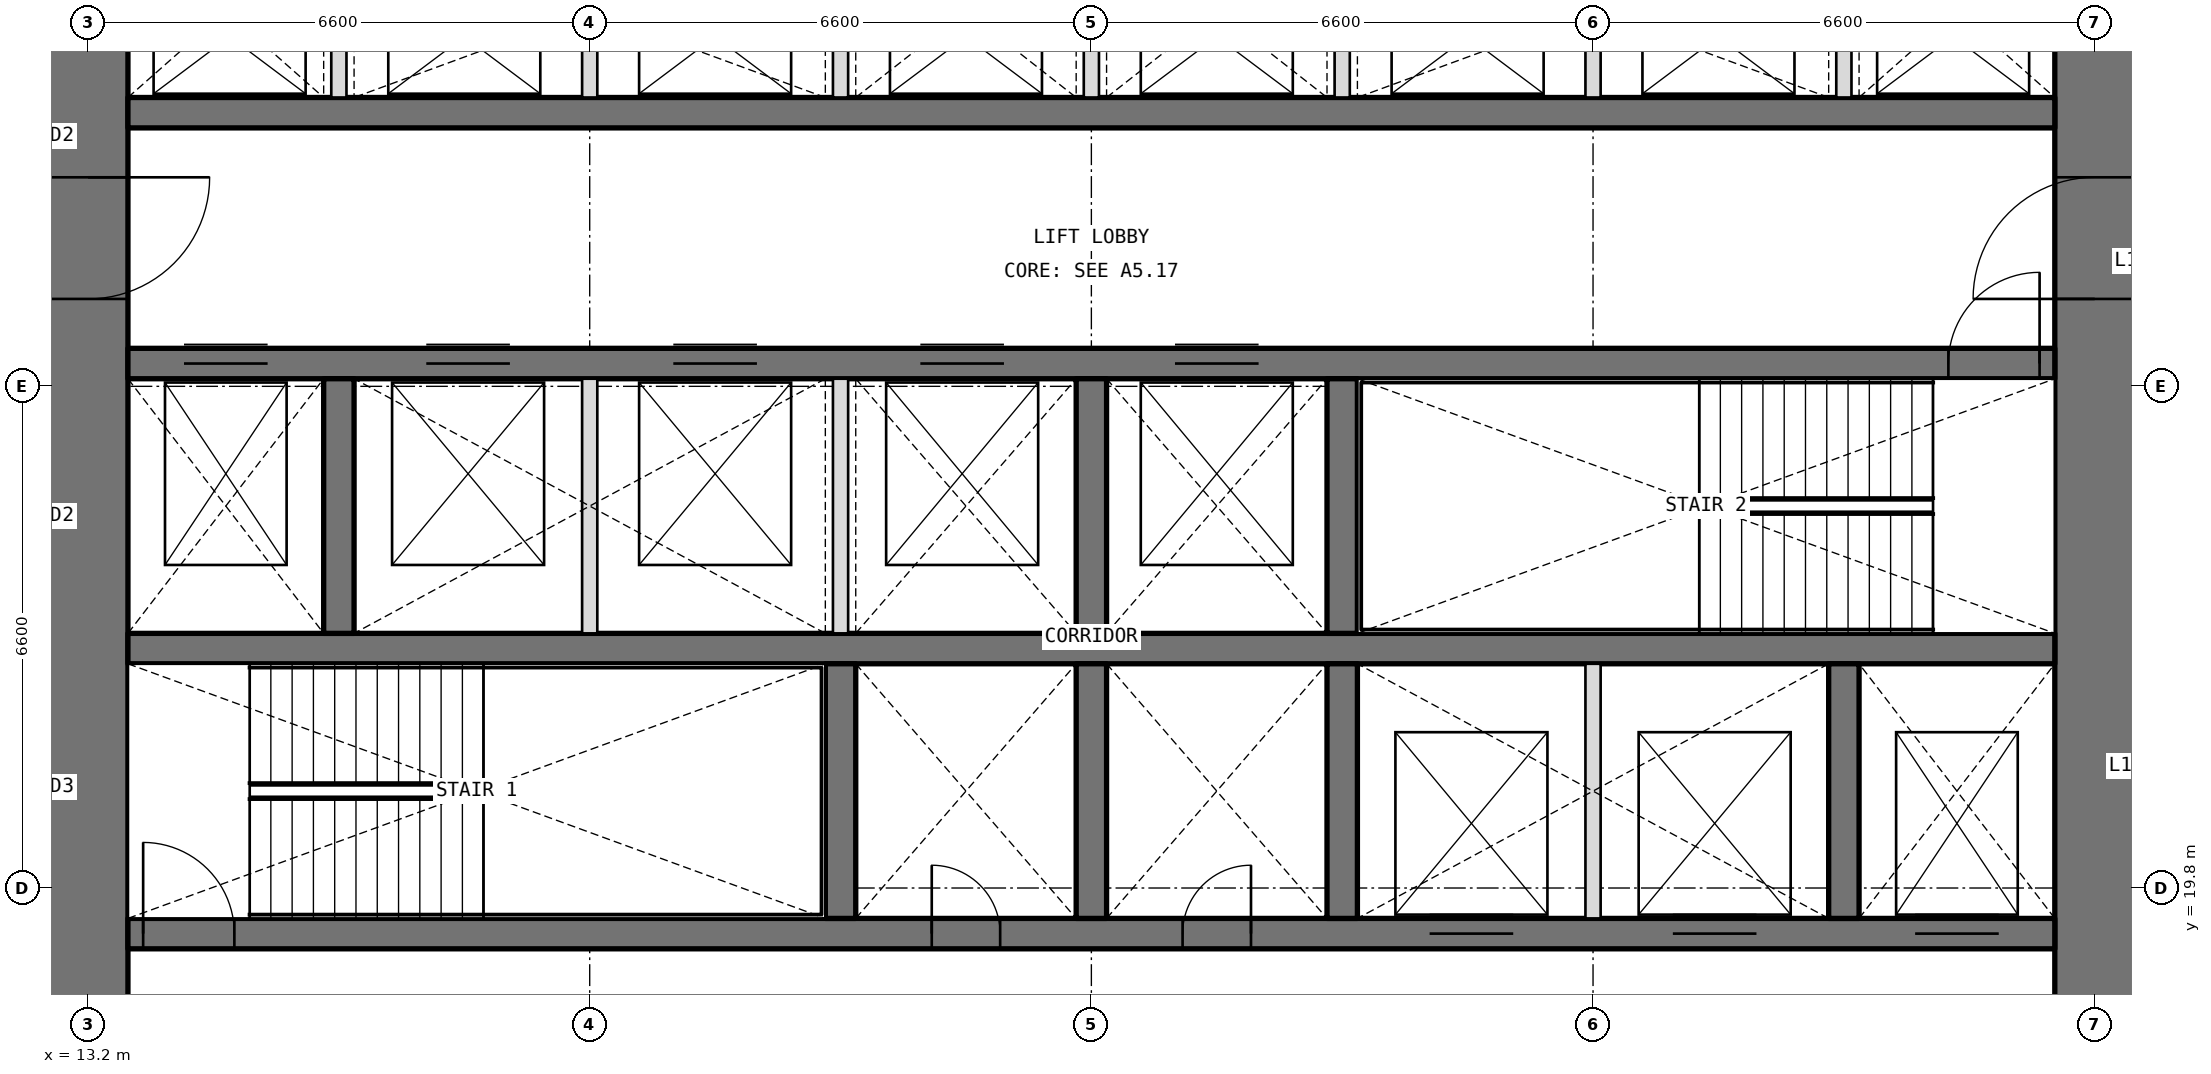
"""IFC4 building model, lengths in metres.
Left out: names, types, materials, properties, quantities, classifications, styles, units other than length and angle.
Written with IfcOpenShell. Run it as: python <this file> out.ifc"""

import sys

from ifc_helpers import new_model, si_unit, direction, frame, frame_2d, origin, place, context, subcontext, project, spatial, rectangle, extrude, element, fill, save


model = new_model("IFC4")
c1 = context("Model", 3, precision=1e-05, world=origin(), true_north=direction((0.0, 1.0)))
c2 = subcontext(c1, "Body", "Model", "MODEL_VIEW")
j1 = project(units=[si_unit("LENGTHUNIT", "METRE"), si_unit("PLANEANGLEUNIT", "RADIAN")], contexts=[c1])
p1 = place(None, origin())
s1 = spatial("IfcSite", under=j1, at=p1, CompositionType="ELEMENT")
p2 = place(p1, origin())
s2 = spatial("IfcBuilding", under=s1, at=p2, CompositionType="ELEMENT")
p3 = place(p2, frame((0.0, 0.0, 67.5)))
s3 = spatial("IfcBuildingStorey", under=s2, at=p3, CompositionType="ELEMENT", Elevation=67.5)
p4 = place(p3, frame((39.6, 13.725, 0.0), z_axis=(0.0, 0.0, 1.0), x_axis=(0.0, 1.0, 0.0)))
e1 = element("IfcWall", 1, at=p4, inside=s3, PredefinedType="SHEAR", context=c2, shape_type="SweptSolid", body=[
    extrude(rectangle(XDim=18.75, YDim=1.05, at=frame_2d((9.375, 0.0))), origin(), (0.0, 0.0, 1.0), 4.2),
])
p5 = place(p4, frame((3.025, 0.0, 0.0)))
e2 = element("IfcOpeningElement", 2, at=p5, cuts=e1, PredefinedType="OPENING", context=c2, shape_type="SweptSolid", body=[
    extrude(rectangle(XDim=1.6, YDim=2.1, at=frame_2d((0.8, 1.05))), frame((0.0, 0.535, 0.0), z_axis=(0.0, -1.0, 0.0), x_axis=(1.0, 0.0, 0.0)), (0.0, 0.0, 1.0), 1.07),
])
p6 = place(p4, frame((13.825, 0.0, 0.0)))
e3 = element("IfcOpeningElement", 3, at=p6, cuts=e1, PredefinedType="OPENING", context=c2, shape_type="SweptSolid", body=[
    extrude(rectangle(XDim=1.6, YDim=2.1, at=frame_2d((0.8, 1.05))), frame((0.0, 0.535, 0.0), z_axis=(0.0, -1.0, 0.0), x_axis=(1.0, 0.0, 0.0)), (0.0, 0.0, 1.0), 1.07),
])
p7 = place(p3, frame((13.2, 32.475, 0.0), z_axis=(0.0, 0.0, 1.0), x_axis=(0.0, -1.0, 0.0)))
e4 = element("IfcWall", 4, at=p7, inside=s3, PredefinedType="SHEAR", context=c2, shape_type="SweptSolid", body=[
    extrude(rectangle(XDim=18.75, YDim=1.05, at=frame_2d((9.375, 0.0))), origin(), (0.0, 0.0, 1.0), 4.2),
])
p8 = place(p7, frame((14.125, 0.0, 0.0)))
e5 = element("IfcOpeningElement", 5, at=p8, cuts=e4, PredefinedType="OPENING", context=c2, shape_type="SweptSolid", body=[
    extrude(rectangle(XDim=1.6, YDim=2.1, at=frame_2d((0.8, 1.05))), frame((0.0, 0.535, 0.0), z_axis=(0.0, -1.0, 0.0), x_axis=(1.0, 0.0, 0.0)), (0.0, 0.0, 1.0), 1.07),
])
p9 = place(p7, frame((3.325, 0.0, 0.0)))
e6 = element("IfcOpeningElement", 6, at=p9, cuts=e4, PredefinedType="OPENING", context=c2, shape_type="SweptSolid", body=[
    extrude(rectangle(XDim=1.6, YDim=2.1, at=frame_2d((0.8, 1.05))), frame((0.0, 0.535, 0.0), z_axis=(0.0, -1.0, 0.0), x_axis=(1.0, 0.0, 0.0)), (0.0, 0.0, 1.0), 1.07),
])
p10 = place(p3, frame((13.725, 19.2, 0.0), z_axis=(0.0, 0.0, 1.0), x_axis=(1.0, 0.0, 0.0)))
e7 = element("IfcWall", 7, at=p10, inside=s3, PredefinedType="SHEAR", context=c2, shape_type="SweptSolid", body=[
    extrude(rectangle(XDim=25.35, YDim=0.4, at=frame_2d((12.675, 0.0))), origin(), (0.0, 0.0, 1.0), 4.2),
])
p11 = place(p10, frame((10.575, 0.0, 0.0)))
e8 = element("IfcOpeningElement", 8, at=p11, cuts=e7, PredefinedType="OPENING", context=c2, shape_type="SweptSolid", body=[
    extrude(rectangle(XDim=0.9, YDim=2.1, at=frame_2d((0.45, 1.05))), frame((0.0, 0.21, 0.0), z_axis=(0.0, -1.0, 0.0), x_axis=(1.0, 0.0, 0.0)), (0.0, 0.0, 1.0), 0.42),
])
p12 = place(p10, frame((13.875, 0.0, 0.0)))
e9 = element("IfcOpeningElement", 9, at=p12, cuts=e7, PredefinedType="OPENING", context=c2, shape_type="SweptSolid", body=[
    extrude(rectangle(XDim=0.9, YDim=2.1, at=frame_2d((0.45, 1.05))), frame((0.0, 0.21, 0.0), z_axis=(0.0, -1.0, 0.0), x_axis=(1.0, 0.0, 0.0)), (0.0, 0.0, 1.0), 0.42),
])
p13 = place(p10, frame((0.2, 0.0, 0.0)))
e10 = element("IfcOpeningElement", 10, at=p13, cuts=e7, PredefinedType="OPENING", context=c2, shape_type="SweptSolid", body=[
    extrude(rectangle(XDim=1.2, YDim=2.1, at=frame_2d((0.6, 1.05))), frame((0.0, 0.21, 0.0), z_axis=(0.0, -1.0, 0.0), x_axis=(1.0, 0.0, 0.0)), (0.0, 0.0, 1.0), 0.42),
])
p14 = place(p10, frame((23.512, 0.0, 0.0)))
e11 = element("IfcOpeningElement", 11, at=p14, cuts=e7, PredefinedType="OPENING", context=c2, shape_type="SweptSolid", body=[
    extrude(rectangle(XDim=1.1, YDim=2.1, at=frame_2d((0.55, 1.05))), frame((0.0, 0.21, 0.0), z_axis=(0.0, -1.0, 0.0), x_axis=(1.0, 0.0, 0.0)), (0.0, 0.0, 1.0), 0.42),
])
p15 = place(p10, frame((17.125, 0.0, 0.0)))
e12 = element("IfcOpeningElement", 12, at=p15, cuts=e7, PredefinedType="OPENING", context=c2, shape_type="SweptSolid", body=[
    extrude(rectangle(XDim=1.1, YDim=2.1, at=frame_2d((0.55, 1.05))), frame((0.0, 0.21, 0.0), z_axis=(0.0, -1.0, 0.0), x_axis=(1.0, 0.0, 0.0)), (0.0, 0.0, 1.0), 0.42),
])
p16 = place(p10, frame((20.325, 0.0, 0.0)))
e13 = element("IfcOpeningElement", 13, at=p16, cuts=e7, PredefinedType="OPENING", context=c2, shape_type="SweptSolid", body=[
    extrude(rectangle(XDim=1.1, YDim=2.1, at=frame_2d((0.55, 1.05))), frame((0.0, 0.21, 0.0), z_axis=(0.0, -1.0, 0.0), x_axis=(1.0, 0.0, 0.0)), (0.0, 0.0, 1.0), 0.42),
])
p17 = place(p3, frame((13.725, 22.95, 0.0), z_axis=(0.0, 0.0, 1.0), x_axis=(1.0, 0.0, 0.0)))
e14 = element("IfcWall", 14, at=p17, inside=s3, PredefinedType="SHEAR", context=c2, shape_type="SweptSolid", body=[
    extrude(rectangle(XDim=25.35, YDim=0.4, at=frame_2d((12.675, 0.0))), origin(), (0.0, 0.0, 1.0), 4.2),
])
p18 = place(p3, frame((13.725, 26.7, 0.0), z_axis=(0.0, 0.0, 1.0), x_axis=(1.0, 0.0, 0.0)))
e15 = element("IfcWall", 15, at=p18, inside=s3, PredefinedType="SHEAR", context=c2, shape_type="SweptSolid", body=[
    extrude(rectangle(XDim=25.35, YDim=0.4, at=frame_2d((12.675, 0.0))), origin(), (0.0, 0.0, 1.0), 4.2),
])
p19 = place(p18, frame((23.95, 0.0, 0.0)))
e16 = element("IfcOpeningElement", 16, at=p19, cuts=e15, PredefinedType="OPENING", context=c2, shape_type="SweptSolid", body=[
    extrude(rectangle(XDim=1.2, YDim=2.1, at=frame_2d((0.6, 1.05))), frame((0.0, 0.21, 0.0), z_axis=(0.0, -1.0, 0.0), x_axis=(1.0, 0.0, 0.0)), (0.0, 0.0, 1.0), 0.42),
])
p20 = place(p18, frame((0.738, 0.0, 0.0)))
e17 = element("IfcOpeningElement", 17, at=p20, cuts=e15, PredefinedType="OPENING", context=c2, shape_type="SweptSolid", body=[
    extrude(rectangle(XDim=1.1, YDim=2.1, at=frame_2d((0.55, 1.05))), frame((0.0, 0.21, 0.0), z_axis=(0.0, -1.0, 0.0), x_axis=(1.0, 0.0, 0.0)), (0.0, 0.0, 1.0), 0.42),
])
p21 = place(p18, frame((3.925, 0.0, 0.0)))
e18 = element("IfcOpeningElement", 18, at=p21, cuts=e15, PredefinedType="OPENING", context=c2, shape_type="SweptSolid", body=[
    extrude(rectangle(XDim=1.1, YDim=2.1, at=frame_2d((0.55, 1.05))), frame((0.0, 0.21, 0.0), z_axis=(0.0, -1.0, 0.0), x_axis=(1.0, 0.0, 0.0)), (0.0, 0.0, 1.0), 0.42),
])
p22 = place(p18, frame((7.175, 0.0, 0.0)))
e19 = element("IfcOpeningElement", 19, at=p22, cuts=e15, PredefinedType="OPENING", context=c2, shape_type="SweptSolid", body=[
    extrude(rectangle(XDim=1.1, YDim=2.1, at=frame_2d((0.55, 1.05))), frame((0.0, 0.21, 0.0), z_axis=(0.0, -1.0, 0.0), x_axis=(1.0, 0.0, 0.0)), (0.0, 0.0, 1.0), 0.42),
])
p23 = place(p18, frame((10.425, 0.0, 0.0)))
e20 = element("IfcOpeningElement", 20, at=p23, cuts=e15, PredefinedType="OPENING", context=c2, shape_type="SweptSolid", body=[
    extrude(rectangle(XDim=1.1, YDim=2.1, at=frame_2d((0.55, 1.05))), frame((0.0, 0.21, 0.0), z_axis=(0.0, -1.0, 0.0), x_axis=(1.0, 0.0, 0.0)), (0.0, 0.0, 1.0), 0.42),
])
p24 = place(p18, frame((13.775, 0.0, 0.0)))
e21 = element("IfcOpeningElement", 21, at=p24, cuts=e15, PredefinedType="OPENING", context=c2, shape_type="SweptSolid", body=[
    extrude(rectangle(XDim=1.1, YDim=2.1, at=frame_2d((0.55, 1.05))), frame((0.0, 0.21, 0.0), z_axis=(0.0, -1.0, 0.0), x_axis=(1.0, 0.0, 0.0)), (0.0, 0.0, 1.0), 0.42),
])
p25 = place(p3, frame((13.725, 30.0, 0.0), z_axis=(0.0, 0.0, 1.0), x_axis=(1.0, 0.0, 0.0)))
e22 = element("IfcWall", 22, at=p25, inside=s3, PredefinedType="SHEAR", context=c2, shape_type="SweptSolid", body=[
    extrude(rectangle(XDim=25.35, YDim=0.4, at=frame_2d((12.675, 0.0))), origin(), (0.0, 0.0, 1.0), 4.2),
])
for number, where, z_axis, x_axis in (
    (23, (23.1, 19.4, 0.0), (0.0, 0.0, 1.0), (0.0, 1.0, 0.0)),
    (24, (26.4, 19.4, 0.0), (0.0, 0.0, 1.0), (0.0, 1.0, 0.0)),
    (25, (29.7, 19.4, 0.0), (0.0, 0.0, 1.0), (0.0, 1.0, 0.0)),
    (26, (36.3, 19.4, 0.0), (0.0, 0.0, 1.0), (0.0, 1.0, 0.0)),
    (27, (16.5, 23.15, 0.0), (0.0, 0.0, 1.0), (0.0, 1.0, 0.0)),
    (28, (26.4, 23.15, 0.0), (0.0, 0.0, 1.0), (0.0, 1.0, 0.0)),
    (29, (29.7, 23.15, 0.0), (0.0, 0.0, 1.0), (0.0, 1.0, 0.0)),
):
    element("IfcWall", number, at=place(p3, frame(where, z_axis=z_axis, x_axis=x_axis)), inside=s3, PredefinedType="SHEAR", context=c2, shape_type="SweptSolid", body=[
        extrude(rectangle(XDim=3.35, YDim=0.4, at=frame_2d((1.675, 0.0))), origin(), (0.0, 0.0, 1.0), 4.2),
    ])
for number, where, z_axis, x_axis in (
    (30, (16.5, 30.2, 0.0), (0.0, 0.0, 1.0), (0.0, 1.0, 0.0)),
    (31, (19.8, 30.2, 0.0), (0.0, 0.0, 1.0), (0.0, 1.0, 0.0)),
    (32, (23.1, 30.2, 0.0), (0.0, 0.0, 1.0), (0.0, 1.0, 0.0)),
    (33, (26.4, 30.2, 0.0), (0.0, 0.0, 1.0), (0.0, 1.0, 0.0)),
    (34, (29.7, 30.2, 0.0), (0.0, 0.0, 1.0), (0.0, 1.0, 0.0)),
    (35, (33.0, 30.2, 0.0), (0.0, 0.0, 1.0), (0.0, 1.0, 0.0)),
    (36, (36.3, 30.2, 0.0), (0.0, 0.0, 1.0), (0.0, 1.0, 0.0)),
):
    element("IfcWall", number, at=place(p3, frame(where, z_axis=z_axis, x_axis=x_axis)), inside=s3, PredefinedType="PARTITIONING", context=c2, shape_type="SweptSolid", body=[
        extrude(rectangle(XDim=2.275, YDim=0.2, at=frame_2d((1.138, 0.0))), origin(), (0.0, 0.0, 1.0), 4.2),
    ])
for number, where, z_axis, x_axis in (
    (37, (33.0, 19.4, 0.0), (0.0, 0.0, 1.0), (0.0, 1.0, 0.0)),
    (38, (19.8, 23.15, 0.0), (0.0, 0.0, 1.0), (0.0, 1.0, 0.0)),
    (39, (23.1, 23.15, 0.0), (0.0, 0.0, 1.0), (0.0, 1.0, 0.0)),
):
    element("IfcWall", number, at=place(p3, frame(where, z_axis=z_axis, x_axis=x_axis)), inside=s3, PredefinedType="PARTITIONING", context=c2, shape_type="SweptSolid", body=[
        extrude(rectangle(XDim=3.35, YDim=0.2, at=frame_2d((1.675, 0.0))), origin(), (0.0, 0.0, 1.0), 4.2),
    ])
p26 = place(p11, origin())
e40 = element("IfcDoor", 40, at=p26, inside=s3, OperationType="SINGLE_SWING_LEFT", PredefinedType="DOOR", context=c2, shape_type="SweptSolid", body=[
    extrude(rectangle(XDim=0.9, YDim=2.1, at=frame_2d((0.45, 1.05))), frame((0.0, 0.025, 0.0), z_axis=(0.0, -1.0, 0.0), x_axis=(1.0, 0.0, 0.0)), (0.0, 0.0, 1.0), 0.05),
])
fill(e8, e40)
p27 = place(p12, origin())
e41 = element("IfcDoor", 41, at=p27, inside=s3, OperationType="SINGLE_SWING_RIGHT", PredefinedType="DOOR", context=c2, shape_type="SweptSolid", body=[
    extrude(rectangle(XDim=0.9, YDim=2.1, at=frame_2d((0.45, 1.05))), frame((0.0, 0.025, 0.0), z_axis=(0.0, -1.0, 0.0), x_axis=(1.0, 0.0, 0.0)), (0.0, 0.0, 1.0), 0.05),
])
fill(e9, e41)
p28 = place(p13, origin())
e42 = element("IfcDoor", 42, at=p28, inside=s3, OperationType="SINGLE_SWING_LEFT", PredefinedType="DOOR", context=c2, shape_type="SweptSolid", body=[
    extrude(rectangle(XDim=1.2, YDim=2.1, at=frame_2d((0.6, 1.05))), frame((0.0, 0.025, 0.0), z_axis=(0.0, -1.0, 0.0), x_axis=(1.0, 0.0, 0.0)), (0.0, 0.0, 1.0), 0.05),
])
fill(e10, e42)
p29 = place(p19, origin())
e43 = element("IfcDoor", 43, at=p29, inside=s3, OperationType="SINGLE_SWING_RIGHT", PredefinedType="DOOR", context=c2, shape_type="SweptSolid", body=[
    extrude(rectangle(XDim=1.2, YDim=2.1, at=frame_2d((0.6, 1.05))), frame((0.0, 0.025, 0.0), z_axis=(0.0, -1.0, 0.0), x_axis=(1.0, 0.0, 0.0)), (0.0, 0.0, 1.0), 0.05),
])
fill(e16, e43)
p30 = place(p9, origin())
e44 = element("IfcDoor", 44, at=p30, inside=s3, OperationType="DOUBLE_DOOR_DOUBLE_SWING", PredefinedType="DOOR", context=c2, shape_type="SweptSolid", body=[
    extrude(rectangle(XDim=1.6, YDim=2.1, at=frame_2d((0.8, 1.05))), frame((0.0, 0.025, 0.0), z_axis=(0.0, -1.0, 0.0), x_axis=(1.0, 0.0, 0.0)), (0.0, 0.0, 1.0), 0.05),
])
fill(e6, e44)
p31 = place(p6, origin())
e45 = element("IfcDoor", 45, at=p31, inside=s3, OperationType="DOUBLE_DOOR_DOUBLE_SWING", PredefinedType="DOOR", context=c2, shape_type="SweptSolid", body=[
    extrude(rectangle(XDim=1.6, YDim=2.1, at=frame_2d((0.8, 1.05))), frame((0.0, 0.025, 0.0), z_axis=(0.0, -1.0, 0.0), x_axis=(1.0, 0.0, 0.0)), (0.0, 0.0, 1.0), 0.05),
])
fill(e3, e45)
p32 = place(p20, origin())
e46 = element("IfcDoor", 46, at=p32, inside=s3, OperationType="DOUBLE_DOOR_SLIDING", PredefinedType="DOOR", context=c2, shape_type="SweptSolid", body=[
    extrude(rectangle(XDim=1.1, YDim=2.1, at=frame_2d((0.55, 1.05))), frame((0.0, 0.025, 0.0), z_axis=(0.0, -1.0, 0.0), x_axis=(1.0, 0.0, 0.0)), (0.0, 0.0, 1.0), 0.05),
])
fill(e17, e46)
p33 = place(p14, origin())
e47 = element("IfcDoor", 47, at=p33, inside=s3, OperationType="DOUBLE_DOOR_SLIDING", PredefinedType="DOOR", context=c2, shape_type="SweptSolid", body=[
    extrude(rectangle(XDim=1.1, YDim=2.1, at=frame_2d((0.55, 1.05))), frame((0.0, 0.025, 0.0), z_axis=(0.0, -1.0, 0.0), x_axis=(1.0, 0.0, 0.0)), (0.0, 0.0, 1.0), 0.05),
])
fill(e11, e47)
p34 = place(p15, origin())
e48 = element("IfcDoor", 48, at=p34, inside=s3, OperationType="DOUBLE_DOOR_SLIDING", PredefinedType="DOOR", context=c2, shape_type="SweptSolid", body=[
    extrude(rectangle(XDim=1.1, YDim=2.1, at=frame_2d((0.55, 1.05))), frame((0.0, 0.025, 0.0), z_axis=(0.0, -1.0, 0.0), x_axis=(1.0, 0.0, 0.0)), (0.0, 0.0, 1.0), 0.05),
])
fill(e12, e48)
p35 = place(p16, origin())
e49 = element("IfcDoor", 49, at=p35, inside=s3, OperationType="DOUBLE_DOOR_SLIDING", PredefinedType="DOOR", context=c2, shape_type="SweptSolid", body=[
    extrude(rectangle(XDim=1.1, YDim=2.1, at=frame_2d((0.55, 1.05))), frame((0.0, 0.025, 0.0), z_axis=(0.0, -1.0, 0.0), x_axis=(1.0, 0.0, 0.0)), (0.0, 0.0, 1.0), 0.05),
])
fill(e13, e49)
p36 = place(p21, origin())
e50 = element("IfcDoor", 50, at=p36, inside=s3, OperationType="DOUBLE_DOOR_SLIDING", PredefinedType="DOOR", context=c2, shape_type="SweptSolid", body=[
    extrude(rectangle(XDim=1.1, YDim=2.1, at=frame_2d((0.55, 1.05))), frame((0.0, 0.025, 0.0), z_axis=(0.0, -1.0, 0.0), x_axis=(1.0, 0.0, 0.0)), (0.0, 0.0, 1.0), 0.05),
])
fill(e18, e50)
p37 = place(p22, origin())
e51 = element("IfcDoor", 51, at=p37, inside=s3, OperationType="DOUBLE_DOOR_SLIDING", PredefinedType="DOOR", context=c2, shape_type="SweptSolid", body=[
    extrude(rectangle(XDim=1.1, YDim=2.1, at=frame_2d((0.55, 1.05))), frame((0.0, 0.025, 0.0), z_axis=(0.0, -1.0, 0.0), x_axis=(1.0, 0.0, 0.0)), (0.0, 0.0, 1.0), 0.05),
])
fill(e19, e51)
p38 = place(p23, origin())
e52 = element("IfcDoor", 52, at=p38, inside=s3, OperationType="DOUBLE_DOOR_SLIDING", PredefinedType="DOOR", context=c2, shape_type="SweptSolid", body=[
    extrude(rectangle(XDim=1.1, YDim=2.1, at=frame_2d((0.55, 1.05))), frame((0.0, 0.025, 0.0), z_axis=(0.0, -1.0, 0.0), x_axis=(1.0, 0.0, 0.0)), (0.0, 0.0, 1.0), 0.05),
])
fill(e20, e52)
p39 = place(p24, origin())
e53 = element("IfcDoor", 53, at=p39, inside=s3, OperationType="DOUBLE_DOOR_SLIDING", PredefinedType="DOOR", context=c2, shape_type="SweptSolid", body=[
    extrude(rectangle(XDim=1.1, YDim=2.1, at=frame_2d((0.55, 1.05))), frame((0.0, 0.025, 0.0), z_axis=(0.0, -1.0, 0.0), x_axis=(1.0, 0.0, 0.0)), (0.0, 0.0, 1.0), 0.05),
])
fill(e21, e53)
save(model, sys.argv[1])
